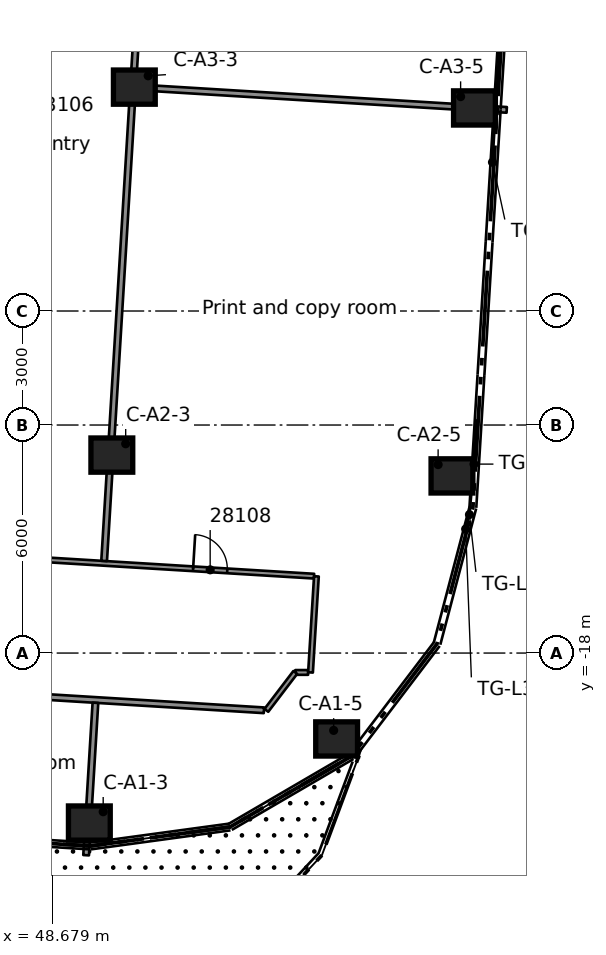
"""IFC4 building model, lengths in metres.
Left out: names, types, materials, properties, quantities, classifications, styles, units other than length and angle.
Written with IfcOpenShell. Run it as: python <this file> out.ifc"""

import sys

from ifc_helpers import new_model, si_unit, direction, frame, frame_2d, origin, origin_2d, place, context, subcontext, project, spatial, rectangle, extrude, element, fill, save


model = new_model("IFC4")
c1 = context("Model", 3, precision=1e-05, world=origin(), true_north=direction((0.0, 1.0)))
c2 = subcontext(c1, "Body", "Model", "MODEL_VIEW")
j1 = project(units=[si_unit("LENGTHUNIT", "METRE"), si_unit("PLANEANGLEUNIT", "RADIAN")], contexts=[c1])
p1 = place(None, origin())
s1 = spatial("IfcSite", under=j1, at=p1, CompositionType="ELEMENT")
p2 = place(p1, origin())
s2 = spatial("IfcBuilding", under=s1, at=p2, CompositionType="ELEMENT")
p3 = place(p2, frame((0.0, 0.0, 145.6)))
s3 = spatial("IfcBuildingStorey", under=s2, at=p3, CompositionType="ELEMENT", Elevation=145.6)
for number, where, z_axis, x_axis in (
    (1, (49.654, -22.473, 0.0), (0.0, 0.0, 1.0), (1.0, 0.0, 0.0)),
    (2, (56.161, -20.26, 0.0), (0.0, 0.0, 1.0), (1.0, 0.0, 0.0)),
    (3, (50.246, -12.791, 0.0), (0.0, 0.0, 1.0), (1.0, 0.0, 0.0)),
    (4, (59.196, -13.339, 0.0), (0.0, 0.0, 1.0), (1.0, 0.0, 0.0)),
    (5, (50.838, -3.109, 0.0), (0.0, 0.0, 1.0), (1.0, 0.0, 0.0)),
    (6, (59.788, -3.657, 0.0), (0.0, 0.0, 1.0), (1.0, 0.0, 0.0)),
):
    element("IfcColumn", number, at=place(p3, frame(where, z_axis=z_axis, x_axis=x_axis)), inside=s3, PredefinedType="COLUMN", context=c2, shape_type="SweptSolid", body=[
        extrude(rectangle(XDim=1.1, YDim=0.9, at=origin_2d()), origin(), (0.0, 0.0, 1.0), 3.5),
    ])
p4 = place(p3, frame((54.248, -19.506, 0.0), z_axis=(0.0, 0.0, 1.0), x_axis=(-0.99812844047, 0.061152402438, 0.0)))
e7 = element("IfcWall", 7, at=p4, inside=s3, PredefinedType="PARTITIONING", context=c2, shape_type="SweptSolid", body=[
    extrude(rectangle(XDim=11.841, YDim=0.15, at=frame_2d((5.921, 0.0))), origin(), (0.0, 0.0, 1.0), 3.08),
])
p5 = place(p4, frame((9.592, 0.0, 0.0)))
e8 = element("IfcOpeningElement", 8, at=p5, cuts=e7, PredefinedType="OPENING", context=c2, shape_type="SweptSolid", body=[
    extrude(rectangle(XDim=0.9, YDim=2.1, at=frame_2d((0.45, 1.05))), frame((0.0, 0.085, 0.0), z_axis=(0.0, -1.0, 0.0), x_axis=(1.0, 0.0, 0.0)), (0.0, 0.0, 1.0), 0.17),
])
p6 = place(p3, frame((46.305, -15.411, 0.0), z_axis=(0.0, 0.0, 1.0), x_axis=(0.998136924193, -0.061013773551, 0.0)))
e9 = element("IfcWall", 9, at=p6, inside=s3, PredefinedType="PARTITIONING", context=c2, shape_type="SweptSolid", body=[
    extrude(rectangle(XDim=9.279, YDim=0.125, at=frame_2d((4.64, 0.0))), origin(), (0.0, 0.0, 1.0), 3.08),
])
p7 = place(p6, frame((6.091, 0.0, 0.0)))
e10 = element("IfcOpeningElement", 10, at=p7, cuts=e9, PredefinedType="OPENING", context=c2, shape_type="SweptSolid", body=[
    extrude(rectangle(XDim=0.9, YDim=2.1, at=frame_2d((0.45, 1.05))), frame((0.0, 0.073, 0.0), z_axis=(0.0, -1.0, 0.0), x_axis=(1.0, 0.0, 0.0)), (0.0, 0.0, 1.0), 0.145),
])
p8 = place(p3, frame((50.88, -3.112, 0.0), z_axis=(0.0, 0.0, 1.0), x_axis=(0.998139914639, -0.060964832519, 0.0)))
e11 = element("IfcWall", 11, at=p8, inside=s3, PredefinedType="PARTITIONING", context=c2, shape_type="SweptSolid", body=[
    extrude(rectangle(XDim=9.775, YDim=0.15, at=frame_2d((4.888, 0.0))), origin(), (0.0, 0.0, 1.0), 3.08),
])
p9 = place(p3, frame((55.073, -18.51, 0.0), z_axis=(0.0, 0.0, 1.0), x_axis=(1.0, 0.0, 0.0)))
e12 = element("IfcWall", 12, at=p9, inside=s3, PredefinedType="PARTITIONING", context=c2, shape_type="SweptSolid", body=[
    extrude(rectangle(XDim=0.338, YDim=0.125, at=frame_2d((0.169, 0.0))), origin(), (0.0, 0.0, 1.0), 3.08),
])
p10 = place(p3, frame((55.474, -18.51, 0.0), z_axis=(0.0, 0.0, 1.0), x_axis=(0.061112023101, 0.998130913574, 0.0)))
e13 = element("IfcWall", 13, at=p10, inside=s3, PredefinedType="PARTITIONING", context=c2, shape_type="SweptSolid", body=[
    extrude(rectangle(XDim=2.533, YDim=0.125, at=frame_2d((1.266, 0.0))), origin(), (0.0, 0.0, 1.0), 3.08),
])
p11 = place(p3, frame((49.569, -23.319, 0.0), z_axis=(0.0, 0.0, 1.0), x_axis=(0.060951910255, 0.998140703827, 0.0)))
e14 = element("IfcWall", 14, at=p11, inside=s3, PredefinedType="PARTITIONING", context=c2, shape_type="SweptSolid", body=[
    extrude(rectangle(XDim=4.018, YDim=0.15, at=frame_2d((2.009, 0.0))), origin(), (0.0, 0.0, 1.0), 3.08),
])
p12 = place(p3, frame((50.043, -15.577, 0.0), z_axis=(0.0, 0.0, 1.0), x_axis=(0.061013458126, 0.998136943474, 0.0)))
e15 = element("IfcWall", 15, at=p12, inside=s3, PredefinedType="PARTITIONING", context=c2, shape_type="SweptSolid", body=[
    extrude(rectangle(XDim=23.945, YDim=0.15, at=frame_2d((11.972, 0.0))), origin(), (0.0, 0.0, 1.0), 3.08),
])
p13 = place(p3, frame((54.312, -19.508, 0.0), z_axis=(0.0, 0.0, 1.0), x_axis=(0.60633035637, 0.79521286392, 0.0)))
e16 = element("IfcWall", 16, at=p13, inside=s3, PredefinedType="PARTITIONING", context=c2, shape_type="SweptSolid", body=[
    extrude(rectangle(XDim=1.255, YDim=0.125, at=frame_2d((0.627, 0.0))), origin(), (0.0, 0.0, 1.0), 3.08),
])
p14 = place(p7, origin())
e17 = element("IfcDoor", 17, at=p14, inside=s3, OperationType="SINGLE_SWING_RIGHT", PredefinedType="DOOR", context=c2, shape_type="SweptSolid", body=[
    extrude(rectangle(XDim=0.9, YDim=2.1, at=frame_2d((0.45, 1.05))), frame((0.0, 0.025, 0.0), z_axis=(0.0, -1.0, 0.0), x_axis=(1.0, 0.0, 0.0)), (0.0, 0.0, 1.0), 0.05),
])
fill(e10, e17)
save(model, sys.argv[1])
